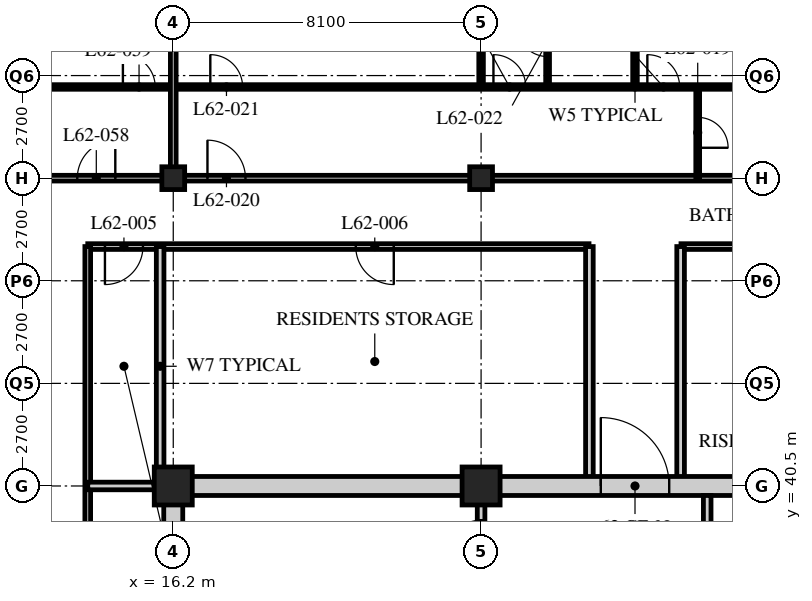
"""IFC4 building model, lengths in metres.
Left out: names, types, materials, properties, quantities, classifications, styles, units other than length and angle.
Written with IfcOpenShell. Run it as: python <this file> out.ifc"""

import sys

from ifc_helpers import new_model, si_unit, direction, frame, frame_2d, origin, origin_2d, place, context, subcontext, project, spatial, rectangle, hollow_rectangle, extrude, element, fill, save


model = new_model("IFC4")
c1 = context("Model", 3, precision=1e-05, world=origin(), true_north=direction((0.0, 1.0)))
c2 = subcontext(c1, "Body", "Model", "MODEL_VIEW")
j1 = project(units=[si_unit("LENGTHUNIT", "METRE"), si_unit("PLANEANGLEUNIT", "RADIAN")], contexts=[c1])
p1 = place(None, origin())
s1 = spatial("IfcSite", under=j1, at=p1, CompositionType="ELEMENT")
p2 = place(p1, origin())
s2 = spatial("IfcBuilding", under=s1, at=p2, CompositionType="ELEMENT")
p3 = place(p2, frame((0.0, 0.0, 242.4)))
s3 = spatial("IfcBuildingStorey", under=s2, at=p3, CompositionType="ELEMENT", Elevation=242.4)
p4 = place(p3, frame((16.2, 40.5, 0.0), z_axis=(0.0, 0.0, 1.0), x_axis=(1.0, 0.0, 0.0)))
e1 = element("IfcColumn", 1, at=p4, inside=s3, PredefinedType="COLUMN", context=c2, shape_type="SweptSolid", body=[
    extrude(hollow_rectangle(XDim=1.0, YDim=1.0, WallThickness=0.1, at=origin_2d()), origin(), (0.0, 0.0, 1.0), 3.9),
])
p5 = place(p3, frame((16.2, 48.6, 0.0), z_axis=(0.0, 0.0, 1.0), x_axis=(1.0, 0.0, 0.0)))
e2 = element("IfcColumn", 2, at=p5, inside=s3, PredefinedType="COLUMN", context=c2, shape_type="SweptSolid", body=[
    extrude(hollow_rectangle(XDim=0.6, YDim=0.6, WallThickness=0.05, at=origin_2d()), origin(), (0.0, 0.0, 1.0), 3.9),
])
p6 = place(p3, frame((24.3, 40.5, 0.0), z_axis=(0.0, 0.0, 1.0), x_axis=(1.0, 0.0, 0.0)))
e3 = element("IfcColumn", 3, at=p6, inside=s3, PredefinedType="COLUMN", context=c2, shape_type="SweptSolid", body=[
    extrude(hollow_rectangle(XDim=1.0, YDim=1.0, WallThickness=0.1, at=origin_2d()), origin(), (0.0, 0.0, 1.0), 3.9),
])
p7 = place(p3, frame((24.3, 48.6, 0.0), z_axis=(0.0, 0.0, 1.0), x_axis=(1.0, 0.0, 0.0)))
e4 = element("IfcColumn", 4, at=p7, inside=s3, PredefinedType="COLUMN", context=c2, shape_type="SweptSolid", body=[
    extrude(hollow_rectangle(XDim=0.6, YDim=0.6, WallThickness=0.05, at=origin_2d()), origin(), (0.0, 0.0, 1.0), 3.9),
])
p8 = place(p3, frame((12.15, 48.6, 0.0), z_axis=(0.0, 0.0, 1.0), x_axis=(1.0, 0.0, 0.0)))
e5 = element("IfcWall", 5, at=p8, inside=s3, PredefinedType="PARTITIONING", context=c2, shape_type="SweptSolid", body=[
    extrude(rectangle(XDim=32.4, YDim=0.15, at=frame_2d((16.2, 0.0))), origin(), (0.0, 0.0, 1.0), 2.928),
])
p9 = place(p8, frame((4.95, 0.0, 0.0)))
e6 = element("IfcOpeningElement", 6, at=p9, cuts=e5, PredefinedType="OPENING", context=c2, shape_type="SweptSolid", body=[
    extrude(rectangle(XDim=1.0, YDim=2.1, at=frame_2d((0.5, 1.05))), frame((0.0, 0.085, 0.0), z_axis=(0.0, -1.0, 0.0), x_axis=(1.0, 0.0, 0.0)), (0.0, 0.0, 1.0), 0.17),
])
p10 = place(p8, frame((21.15, 0.0, 0.0)))
e7 = element("IfcOpeningElement", 7, at=p10, cuts=e5, PredefinedType="OPENING", context=c2, shape_type="SweptSolid", body=[
    extrude(rectangle(XDim=1.0, YDim=2.1, at=frame_2d((0.5, 1.05))), frame((0.0, 0.085, 0.0), z_axis=(0.0, -1.0, 0.0), x_axis=(1.0, 0.0, 0.0)), (0.0, 0.0, 1.0), 0.17),
])
p11 = place(p8, frame((29.875, 0.0, 0.0)))
e8 = element("IfcOpeningElement", 8, at=p11, cuts=e5, PredefinedType="OPENING", context=c2, shape_type="SweptSolid", body=[
    extrude(rectangle(XDim=1.0, YDim=2.1, at=frame_2d((0.5, 1.05))), frame((0.0, 0.085, 0.0), z_axis=(0.0, -1.0, 0.0), x_axis=(1.0, 0.0, 0.0)), (0.0, 0.0, 1.0), 0.17),
])
p12 = place(p8, frame((1.525, 0.0, 0.0)))
e9 = element("IfcOpeningElement", 9, at=p12, cuts=e5, PredefinedType="OPENING", context=c2, shape_type="SweptSolid", body=[
    extrude(rectangle(XDim=1.0, YDim=2.1, at=frame_2d((0.5, 1.05))), frame((0.0, 0.085, 0.0), z_axis=(0.0, -1.0, 0.0), x_axis=(1.0, 0.0, 0.0)), (0.0, 0.0, 1.0), 0.17),
])
p13 = place(p3, frame((42.75, 46.8, 0.0), z_axis=(0.0, 0.0, 1.0), x_axis=(-1.0, 0.0, 0.0)))
e10 = element("IfcWall", 10, at=p13, inside=s3, PredefinedType="PARTITIONING", context=c2, shape_type="SweptSolid", body=[
    extrude(rectangle(XDim=13.19, YDim=0.15, at=frame_2d((6.595, 0.0))), origin(), (0.0, 0.0, 1.0), 3.69),
])
p14 = place(p13, frame((6.1, 0.0, 0.0)))
e11 = element("IfcOpeningElement", 11, at=p14, cuts=e10, PredefinedType="OPENING", context=c2, shape_type="SweptSolid", body=[
    extrude(rectangle(XDim=1.0, YDim=2.1, at=frame_2d((0.5, 1.05))), frame((0.0, 0.085, 0.0), z_axis=(0.0, -1.0, 0.0), x_axis=(1.0, 0.0, 0.0)), (0.0, 0.0, 1.0), 0.17),
])
p15 = place(p3, frame((27.14, 46.8, 0.0), z_axis=(0.0, 0.0, 1.0), x_axis=(-1.0, 0.0, 0.0)))
e12 = element("IfcWall", 12, at=p15, inside=s3, PredefinedType="PARTITIONING", context=c2, shape_type="SweptSolid", body=[
    extrude(rectangle(XDim=13.19, YDim=0.15, at=frame_2d((6.595, 0.0))), origin(), (0.0, 0.0, 1.0), 3.69),
])
p16 = place(p15, frame((11.738, 0.0, 0.0)))
e13 = element("IfcOpeningElement", 13, at=p16, cuts=e12, PredefinedType="OPENING", context=c2, shape_type="SweptSolid", body=[
    extrude(rectangle(XDim=1.0, YDim=2.1, at=frame_2d((0.5, 1.05))), frame((0.0, 0.085, 0.0), z_axis=(0.0, -1.0, 0.0), x_axis=(1.0, 0.0, 0.0)), (0.0, 0.0, 1.0), 0.17),
])
p17 = place(p15, frame((5.138, 0.0, 0.0)))
e14 = element("IfcOpeningElement", 14, at=p17, cuts=e12, PredefinedType="OPENING", context=c2, shape_type="SweptSolid", body=[
    extrude(rectangle(XDim=1.0, YDim=2.1, at=frame_2d((0.5, 1.05))), frame((0.0, 0.085, 0.0), z_axis=(0.0, -1.0, 0.0), x_axis=(1.0, 0.0, 0.0)), (0.0, 0.0, 1.0), 0.17),
])
p18 = place(p3, frame((13.95, 46.8, 0.0), z_axis=(0.0, 0.0, 1.0), x_axis=(0.0, -1.0, 0.0)))
e15 = element("IfcWall", 15, at=p18, inside=s3, PredefinedType="PARTITIONING", context=c2, shape_type="SweptSolid", body=[
    extrude(rectangle(XDim=22.5, YDim=0.15, at=frame_2d((11.25, 0.0))), origin(), (0.0, 0.0, 1.0), 3.69),
])
p19 = place(p18, frame((17.95, 0.0, 0.0)))
e16 = element("IfcOpeningElement", 16, at=p19, cuts=e15, PredefinedType="OPENING", context=c2, shape_type="SweptSolid", body=[
    extrude(rectangle(XDim=1.0, YDim=2.1, at=frame_2d((0.5, 1.05))), frame((0.0, 0.085, 0.0), z_axis=(0.0, -1.0, 0.0), x_axis=(1.0, 0.0, 0.0)), (0.0, 0.0, 1.0), 0.17),
])
p20 = place(p18, frame((9.85, 0.0, 0.0)))
e17 = element("IfcOpeningElement", 17, at=p20, cuts=e15, PredefinedType="OPENING", context=c2, shape_type="SweptSolid", body=[
    extrude(rectangle(XDim=1.0, YDim=2.1, at=frame_2d((0.5, 1.05))), frame((0.0, 0.085, 0.0), z_axis=(0.0, -1.0, 0.0), x_axis=(1.0, 0.0, 0.0)), (0.0, 0.0, 1.0), 0.17),
])
for number, where, z_axis, x_axis in (
    (18, (15.855, 46.8, 0.0), (0.0, 0.0, 1.0), (0.0, -1.0, 0.0)),
    (19, (27.15, 40.5, 0.0), (0.0, 0.0, 1.0), (0.0, 1.0, 0.0)),
    (20, (29.55, 40.5, 0.0), (0.0, 0.0, 1.0), (0.0, 1.0, 0.0)),
):
    element("IfcWall", number, at=place(p3, frame(where, z_axis=z_axis, x_axis=x_axis)), inside=s3, PredefinedType="SOLIDWALL", context=c2, shape_type="SweptSolid", body=[
        extrude(rectangle(XDim=6.3, YDim=0.2, at=frame_2d((3.15, 0.0))), origin(), (0.0, 0.0, 1.0), 3.69),
    ])
p21 = place(p3, frame((13.95, 40.5, 0.0), z_axis=(0.0, 0.0, 1.0), x_axis=(1.0, 0.0, 0.0)))
e21 = element("IfcWall", 21, at=p21, inside=s3, PredefinedType="SOLIDWALL", context=c2, shape_type="SweptSolid", body=[
    extrude(rectangle(XDim=2.25, YDim=0.2, at=frame_2d((1.125, 0.0))), origin(), (0.0, 0.0, 1.0), 2.928),
])
p22 = place(p3, frame((30.0, 48.6, 0.0), z_axis=(0.0, 0.0, 1.0), x_axis=(0.0, 1.0, 0.0)))
e22 = element("IfcWall", 22, at=p22, inside=s3, PredefinedType="PARTITIONING", context=c2, shape_type="SweptSolid", body=[
    extrude(rectangle(XDim=2.4, YDim=0.1, at=frame_2d((1.2, 0.0))), origin(), (0.0, 0.0, 1.0), 3.69),
])
p23 = place(p22, frame((0.8, 0.0, 0.0)))
e23 = element("IfcOpeningElement", 23, at=p23, cuts=e22, PredefinedType="OPENING", context=c2, shape_type="SweptSolid", body=[
    extrude(rectangle(XDim=0.8, YDim=2.1, at=frame_2d((0.4, 1.05))), frame((0.0, 0.06, 0.0), z_axis=(0.0, -1.0, 0.0), x_axis=(1.0, 0.0, 0.0)), (0.0, 0.0, 1.0), 0.12),
])
p24 = place(p3, frame((26.05, 51.0, 0.0), z_axis=(0.0, 0.0, 1.0), x_axis=(0.0, 1.0, 0.0)))
e24 = element("IfcWall", 24, at=p24, inside=s3, PredefinedType="PARTITIONING", context=c2, shape_type="SweptSolid", body=[
    extrude(rectangle(XDim=2.4, YDim=0.1, at=frame_2d((1.2, 0.0))), origin(), (0.0, 0.0, 1.0), 3.69),
])
p25 = place(p24, frame((0.8, 0.0, 0.0)))
e25 = element("IfcOpeningElement", 25, at=p25, cuts=e24, PredefinedType="OPENING", context=c2, shape_type="SweptSolid", body=[
    extrude(rectangle(XDim=0.8, YDim=2.1, at=frame_2d((0.4, 1.05))), frame((0.0, 0.06, 0.0), z_axis=(0.0, -1.0, 0.0), x_axis=(1.0, 0.0, 0.0)), (0.0, 0.0, 1.0), 0.12),
])
p26 = place(p3, frame((24.3, 51.0, 0.0), z_axis=(0.0, 0.0, 1.0), x_axis=(0.0, 1.0, 0.0)))
e26 = element("IfcWall", 26, at=p26, inside=s3, PredefinedType="PARTITIONING", context=c2, shape_type="SweptSolid", body=[
    extrude(rectangle(XDim=13.5, YDim=0.12, at=frame_2d((6.75, 0.0))), origin(), (0.0, 0.0, 1.0), 2.928),
])
p27 = place(p3, frame((28.35, 51.0, 0.0), z_axis=(0.0, 0.0, 1.0), x_axis=(0.0, 1.0, 0.0)))
e27 = element("IfcWall", 27, at=p27, inside=s3, PredefinedType="PARTITIONING", context=c2, shape_type="SweptSolid", body=[
    extrude(rectangle(XDim=13.5, YDim=0.12, at=frame_2d((6.75, 0.0))), origin(), (0.0, 0.0, 1.0), 3.69),
])
p28 = place(p3, frame((8.15, 51.0, 0.0), z_axis=(0.0, 0.0, 1.0), x_axis=(1.0, 0.0, 0.0)))
e28 = element("IfcWall", 28, at=p28, inside=s3, PredefinedType="PARTITIONING", context=c2, shape_type="SweptSolid", body=[
    extrude(rectangle(XDim=40.4, YDim=0.12, at=frame_2d((20.2, 0.0))), origin(), (0.0, 0.0, 1.0), 3.69),
])
p29 = place(p28, frame((9.025, 0.0, 0.0)))
e29 = element("IfcOpeningElement", 29, at=p29, cuts=e28, PredefinedType="OPENING", context=c2, shape_type="SweptSolid", body=[
    extrude(rectangle(XDim=0.85, YDim=2.1, at=frame_2d((0.425, 1.05))), frame((0.0, 0.07, 0.0), z_axis=(0.0, -1.0, 0.0), x_axis=(1.0, 0.0, 0.0)), (0.0, 0.0, 1.0), 0.14),
])
p30 = place(p28, frame((16.475, 0.0, 0.0)))
e30 = element("IfcOpeningElement", 30, at=p30, cuts=e28, PredefinedType="OPENING", context=c2, shape_type="SweptSolid", body=[
    extrude(rectangle(XDim=0.85, YDim=2.1, at=frame_2d((0.425, 1.05))), frame((0.0, 0.07, 0.0), z_axis=(0.0, -1.0, 0.0), x_axis=(1.0, 0.0, 0.0)), (0.0, 0.0, 1.0), 0.14),
])
p31 = place(p28, frame((20.525, 0.0, 0.0)))
e31 = element("IfcOpeningElement", 31, at=p31, cuts=e28, PredefinedType="OPENING", context=c2, shape_type="SweptSolid", body=[
    extrude(rectangle(XDim=0.85, YDim=2.1, at=frame_2d((0.425, 1.05))), frame((0.0, 0.07, 0.0), z_axis=(0.0, -1.0, 0.0), x_axis=(1.0, 0.0, 0.0)), (0.0, 0.0, 1.0), 0.14),
])
p32 = place(p28, frame((25.225, 0.0, 0.0)))
e32 = element("IfcOpeningElement", 32, at=p32, cuts=e28, PredefinedType="OPENING", context=c2, shape_type="SweptSolid", body=[
    extrude(rectangle(XDim=0.85, YDim=2.1, at=frame_2d((0.425, 1.05))), frame((0.0, 0.07, 0.0), z_axis=(0.0, -1.0, 0.0), x_axis=(1.0, 0.0, 0.0)), (0.0, 0.0, 1.0), 0.14),
])
p33 = place(p28, frame((28.625, 0.0, 0.0)))
e33 = element("IfcOpeningElement", 33, at=p33, cuts=e28, PredefinedType="OPENING", context=c2, shape_type="SweptSolid", body=[
    extrude(rectangle(XDim=0.85, YDim=2.1, at=frame_2d((0.425, 1.05))), frame((0.0, 0.07, 0.0), z_axis=(0.0, -1.0, 0.0), x_axis=(1.0, 0.0, 0.0)), (0.0, 0.0, 1.0), 0.14),
])
p34 = place(p28, frame((32.825, 0.0, 0.0)))
e34 = element("IfcOpeningElement", 34, at=p34, cuts=e28, PredefinedType="OPENING", context=c2, shape_type="SweptSolid", body=[
    extrude(rectangle(XDim=0.85, YDim=2.1, at=frame_2d((0.425, 1.05))), frame((0.0, 0.07, 0.0), z_axis=(0.0, -1.0, 0.0), x_axis=(1.0, 0.0, 0.0)), (0.0, 0.0, 1.0), 0.14),
])
p35 = place(p28, frame((36.675, 0.0, 0.0)))
e35 = element("IfcOpeningElement", 35, at=p35, cuts=e28, PredefinedType="OPENING", context=c2, shape_type="SweptSolid", body=[
    extrude(rectangle(XDim=0.85, YDim=2.1, at=frame_2d((0.425, 1.05))), frame((0.0, 0.07, 0.0), z_axis=(0.0, -1.0, 0.0), x_axis=(1.0, 0.0, 0.0)), (0.0, 0.0, 1.0), 0.14),
])
p36 = place(p28, frame((6.725, 0.0, 0.0)))
e36 = element("IfcOpeningElement", 36, at=p36, cuts=e28, PredefinedType="OPENING", context=c2, shape_type="SweptSolid", body=[
    extrude(rectangle(XDim=0.85, YDim=2.1, at=frame_2d((0.425, 1.05))), frame((0.0, 0.07, 0.0), z_axis=(0.0, -1.0, 0.0), x_axis=(1.0, 0.0, 0.0)), (0.0, 0.0, 1.0), 0.14),
])
p37 = place(p28, frame((2.875, 0.0, 0.0)))
e37 = element("IfcOpeningElement", 37, at=p37, cuts=e28, PredefinedType="OPENING", context=c2, shape_type="SweptSolid", body=[
    extrude(rectangle(XDim=0.85, YDim=2.1, at=frame_2d((0.425, 1.05))), frame((0.0, 0.07, 0.0), z_axis=(0.0, -1.0, 0.0), x_axis=(1.0, 0.0, 0.0)), (0.0, 0.0, 1.0), 0.14),
])
p38 = place(p3, frame((16.2, 48.6, 0.0), z_axis=(0.0, 0.0, 1.0), x_axis=(0.0, 1.0, 0.0)))
e38 = element("IfcWall", 38, at=p38, inside=s3, PredefinedType="PARTITIONING", context=c2, shape_type="SweptSolid", body=[
    extrude(rectangle(XDim=15.9, YDim=0.15, at=frame_2d((7.95, 0.0))), origin(), (0.0, 0.0, 1.0), 2.928),
])
p39 = place(p3, frame((15.95, 40.5, 0.0), z_axis=(0.0, 0.0, 1.0), x_axis=(1.0, 0.0, 0.0)))
e39 = element("IfcWall", 39, at=p39, inside=s3, PredefinedType="SOLIDWALL", context=c2, shape_type="SweptSolid", body=[
    extrude(rectangle(XDim=24.8, YDim=0.5, at=frame_2d((12.4, 0.0))), origin(), (0.0, 0.0, 1.0), 2.928),
])
p40 = place(p39, frame((11.5, 0.0, 0.0)))
e40 = element("IfcOpeningElement", 40, at=p40, cuts=e39, PredefinedType="OPENING", context=c2, shape_type="SweptSolid", body=[
    extrude(rectangle(XDim=1.8, YDim=2.4, at=frame_2d((0.9, 1.2))), frame((0.0, 0.26, 0.0), z_axis=(0.0, -1.0, 0.0), x_axis=(1.0, 0.0, 0.0)), (0.0, 0.0, 1.0), 0.52),
])
p41 = place(p3, frame((16.2, 24.55, 0.0), z_axis=(0.0, 0.0, 1.0), x_axis=(0.0, 1.0, 0.0)))
e41 = element("IfcWall", 41, at=p41, inside=s3, PredefinedType="SOLIDWALL", context=c2, shape_type="SweptSolid", body=[
    extrude(rectangle(XDim=15.7, YDim=0.5, at=frame_2d((7.85, 0.0))), origin(), (0.0, 0.0, 1.0), 2.928),
])
p42 = place(p3, frame((30.25, 38.65, 0.0), z_axis=(0.0, 0.0, 1.0), x_axis=(0.0, 1.0, 0.0)))
e42 = element("IfcWall", 42, at=p42, inside=s3, PredefinedType="SOLIDWALL", context=c2, shape_type="SweptSolid", body=[
    extrude(rectangle(XDim=1.6, YDim=0.2, at=frame_2d((0.8, 0.0))), origin(), (0.0, 0.0, 1.0), 3.69),
])
p43 = place(p3, frame((24.3, 32.5, 0.0), z_axis=(0.0, 0.0, 1.0), x_axis=(0.0, 1.0, 0.0)))
e43 = element("IfcWall", 43, at=p43, inside=s3, PredefinedType="PARTITIONING", context=c2, shape_type="SweptSolid", body=[
    extrude(rectangle(XDim=7.75, YDim=0.2, at=frame_2d((3.875, 0.0))), origin(), (0.0, 0.0, 1.0), 3.078),
])
p44 = place(p43, frame((2.4, 0.0, 0.0)))
e44 = element("IfcOpeningElement", 44, at=p44, cuts=e43, PredefinedType="OPENING", context=c2, shape_type="SweptSolid", body=[
    extrude(rectangle(XDim=0.9, YDim=2.1, at=frame_2d((0.45, 1.05))), frame((0.0, 0.11, 0.0), z_axis=(0.0, -1.0, 0.0), x_axis=(1.0, 0.0, 0.0)), (0.0, 0.0, 1.0), 0.22),
])
p45 = place(p43, frame((6.2, 0.0, 0.0)))
e45 = element("IfcOpeningElement", 45, at=p45, cuts=e43, PredefinedType="OPENING", context=c2, shape_type="SweptSolid", body=[
    extrude(rectangle(XDim=0.9, YDim=2.1, at=frame_2d((0.45, 1.05))), frame((0.0, 0.11, 0.0), z_axis=(0.0, -1.0, 0.0), x_axis=(1.0, 0.0, 0.0)), (0.0, 0.0, 1.0), 0.22),
])
p46 = place(p16, origin())
e46 = element("IfcDoor", 46, at=p46, inside=s3, OperationType="SINGLE_SWING_RIGHT", PredefinedType="DOOR", context=c2, shape_type="SweptSolid", body=[
    extrude(rectangle(XDim=1.0, YDim=2.1, at=frame_2d((0.5, 1.05))), frame((0.0, 0.025, 0.0), z_axis=(0.0, -1.0, 0.0), x_axis=(1.0, 0.0, 0.0)), (0.0, 0.0, 1.0), 0.05),
])
fill(e13, e46)
p47 = place(p17, origin())
e47 = element("IfcDoor", 47, at=p47, inside=s3, OperationType="SINGLE_SWING_LEFT", PredefinedType="DOOR", context=c2, shape_type="SweptSolid", body=[
    extrude(rectangle(XDim=1.0, YDim=2.1, at=frame_2d((0.5, 1.05))), frame((0.0, 0.025, 0.0), z_axis=(0.0, -1.0, 0.0), x_axis=(1.0, 0.0, 0.0)), (0.0, 0.0, 1.0), 0.05),
])
fill(e14, e47)
p48 = place(p23, origin())
e48 = element("IfcDoor", 48, at=p48, inside=s3, OperationType="SINGLE_SWING_RIGHT", PredefinedType="DOOR", context=c2, shape_type="SweptSolid", body=[
    extrude(rectangle(XDim=0.8, YDim=2.1, at=frame_2d((0.4, 1.05))), frame((0.0, 0.025, 0.0), z_axis=(0.0, -1.0, 0.0), x_axis=(1.0, 0.0, 0.0)), (0.0, 0.0, 1.0), 0.05),
])
fill(e23, e48)
p49 = place(p9, origin())
e49 = element("IfcDoor", 49, at=p49, inside=s3, OperationType="SINGLE_SWING_LEFT", PredefinedType="DOOR", context=c2, shape_type="SweptSolid", body=[
    extrude(rectangle(XDim=1.0, YDim=2.1, at=frame_2d((0.5, 1.05))), frame((0.0, 0.025, 0.0), z_axis=(0.0, -1.0, 0.0), x_axis=(1.0, 0.0, 0.0)), (0.0, 0.0, 1.0), 0.05),
])
fill(e6, e49)
p50 = place(p29, origin())
e50 = element("IfcDoor", 50, at=p50, inside=s3, OperationType="SINGLE_SWING_LEFT", PredefinedType="DOOR", context=c2, shape_type="SweptSolid", body=[
    extrude(rectangle(XDim=0.85, YDim=2.1, at=frame_2d((0.425, 1.05))), frame((0.0, 0.025, 0.0), z_axis=(0.0, -1.0, 0.0), x_axis=(1.0, 0.0, 0.0)), (0.0, 0.0, 1.0), 0.05),
])
fill(e29, e50)
p51 = place(p25, origin())
e51 = element("IfcDoor", 51, at=p51, inside=s3, OperationType="SINGLE_SWING_RIGHT", PredefinedType="DOOR", context=c2, shape_type="SweptSolid", body=[
    extrude(rectangle(XDim=0.8, YDim=2.1, at=frame_2d((0.4, 1.05))), frame((0.0, 0.025, 0.0), z_axis=(0.0, -1.0, 0.0), x_axis=(1.0, 0.0, 0.0)), (0.0, 0.0, 1.0), 0.05),
])
fill(e25, e51)
p52 = place(p30, origin())
e52 = element("IfcDoor", 52, at=p52, inside=s3, OperationType="SINGLE_SWING_LEFT", PredefinedType="DOOR", context=c2, shape_type="SweptSolid", body=[
    extrude(rectangle(XDim=0.85, YDim=2.1, at=frame_2d((0.425, 1.05))), frame((0.0, 0.025, 0.0), z_axis=(0.0, -1.0, 0.0), x_axis=(1.0, 0.0, 0.0)), (0.0, 0.0, 1.0), 0.05),
])
fill(e30, e52)
p53 = place(p31, origin())
e53 = element("IfcDoor", 53, at=p53, inside=s3, OperationType="SINGLE_SWING_LEFT", PredefinedType="DOOR", context=c2, shape_type="SweptSolid", body=[
    extrude(rectangle(XDim=0.85, YDim=2.1, at=frame_2d((0.425, 1.05))), frame((0.0, 0.025, 0.0), z_axis=(0.0, -1.0, 0.0), x_axis=(1.0, 0.0, 0.0)), (0.0, 0.0, 1.0), 0.05),
])
fill(e31, e53)
p54 = place(p12, origin())
e54 = element("IfcDoor", 54, at=p54, inside=s3, OperationType="SINGLE_SWING_RIGHT", PredefinedType="DOOR", context=c2, shape_type="SweptSolid", body=[
    extrude(rectangle(XDim=1.0, YDim=2.1, at=frame_2d((0.5, 1.05))), frame((0.0, 0.025, 0.0), z_axis=(0.0, -1.0, 0.0), x_axis=(1.0, 0.0, 0.0)), (0.0, 0.0, 1.0), 0.05),
])
fill(e9, e54)
p55 = place(p36, origin())
e55 = element("IfcDoor", 55, at=p55, inside=s3, OperationType="SINGLE_SWING_LEFT", PredefinedType="DOOR", context=c2, shape_type="SweptSolid", body=[
    extrude(rectangle(XDim=0.85, YDim=2.1, at=frame_2d((0.425, 1.05))), frame((0.0, 0.025, 0.0), z_axis=(0.0, -1.0, 0.0), x_axis=(1.0, 0.0, 0.0)), (0.0, 0.0, 1.0), 0.05),
])
fill(e36, e55)
p56 = place(p45, origin())
e56 = element("IfcDoor", 56, at=p56, inside=s3, OperationType="SINGLE_SWING_LEFT", PredefinedType="DOOR", context=c2, shape_type="SweptSolid", body=[
    extrude(rectangle(XDim=0.9, YDim=2.1, at=frame_2d((0.45, 1.05))), frame((0.0, 0.025, 0.0), z_axis=(0.0, -1.0, 0.0), x_axis=(1.0, 0.0, 0.0)), (0.0, 0.0, 1.0), 0.05),
])
fill(e45, e56)
p57 = place(p40, origin())
e57 = element("IfcDoor", 57, at=p57, inside=s3, OperationType="DOUBLE_DOOR_SINGLE_SWING", PredefinedType="DOOR", context=c2, shape_type="SweptSolid", body=[
    extrude(rectangle(XDim=1.8, YDim=2.4, at=frame_2d((0.9, 1.2))), frame((0.0, 0.025, 0.0), z_axis=(0.0, -1.0, 0.0), x_axis=(1.0, 0.0, 0.0)), (0.0, 0.0, 1.0), 0.05),
])
fill(e40, e57)
save(model, sys.argv[1])
